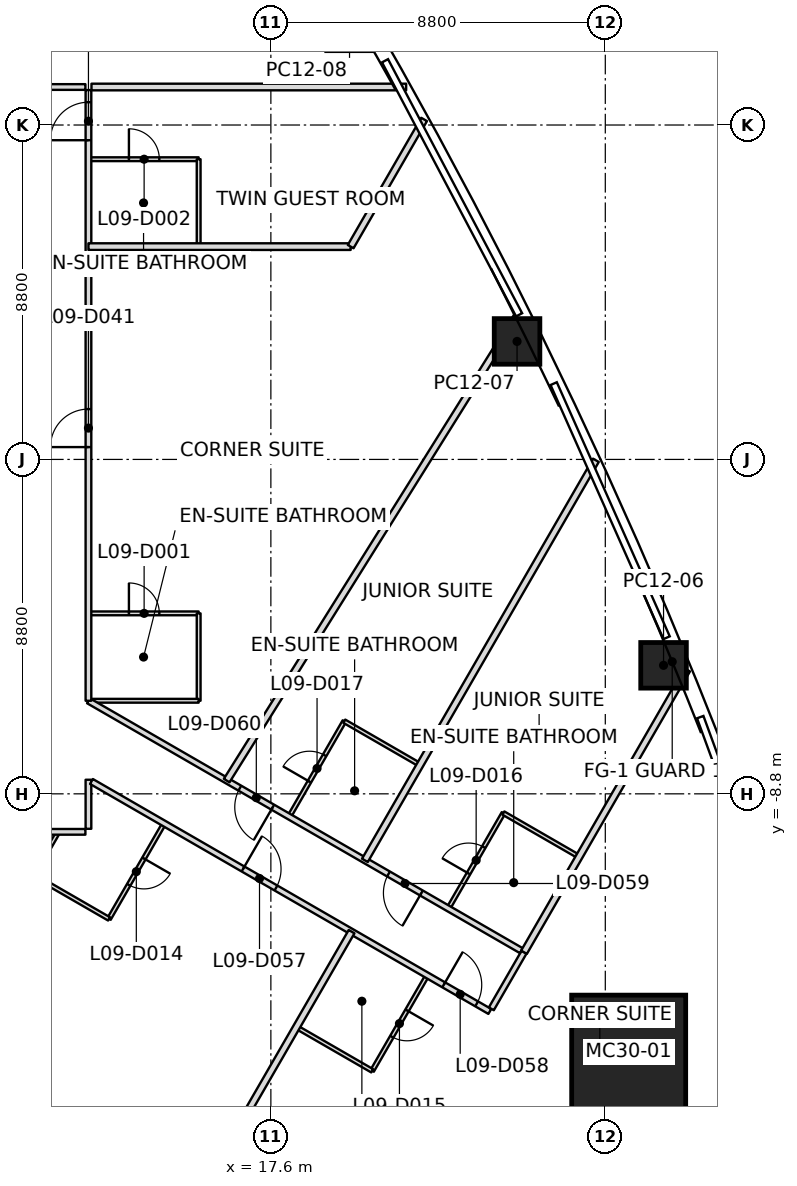
"""IFC4 building model, lengths in metres.
Left out: names, types, materials, properties, quantities, classifications, styles, units other than length and angle.
Written with IfcOpenShell. Run it as: python <this file> out.ifc"""

import sys

from ifc_helpers import new_model, si_unit, direction, frame, frame_2d, origin, origin_2d, place, context, subcontext, project, spatial, rectangle, extrude, element, fill, save


model = new_model("IFC4")
c1 = context("Model", 3, precision=1e-05, world=origin(), true_north=direction((0.0, 1.0)))
c2 = subcontext(c1, "Body", "Model", "MODEL_VIEW")
j1 = project(units=[si_unit("LENGTHUNIT", "METRE"), si_unit("PLANEANGLEUNIT", "RADIAN")], contexts=[c1])
p1 = place(None, origin())
s1 = spatial("IfcSite", under=j1, at=p1, CompositionType="ELEMENT")
p2 = place(p1, origin())
s2 = spatial("IfcBuilding", under=s1, at=p2, CompositionType="ELEMENT")
p3 = place(p2, frame((0.0, 0.0, 55.4)))
s3 = spatial("IfcBuildingStorey", under=s2, at=p3, CompositionType="ELEMENT", Elevation=55.4)
p4 = place(p3, frame((27.015, -15.597, 0.0), z_axis=(-0.030595822255, 0.017671724923, 0.999375607967), x_axis=(0.999531838243, 0.000540934199, 0.030591040022)))
e1 = element("IfcColumn", 1, at=p4, inside=s3, PredefinedType="COLUMN", context=c2, shape_type="SweptSolid", body=[
    extrude(rectangle(XDim=3.0, YDim=3.0, at=origin_2d()), origin(), (0.0, 0.0, 1.0), 3.702),
])
p5 = place(p3, frame((27.933, -5.418, 0.0), z_axis=(-0.019459371732, 0.011015983319, 0.999749959221), x_axis=(-0.381749906574, 0.924097828084, -0.017612863535)))
e2 = element("IfcColumn", 2, at=p5, inside=s3, PredefinedType="COLUMN", context=c2, shape_type="SweptSolid", body=[
    extrude(rectangle(XDim=1.2, YDim=1.2, at=origin_2d()), origin(), (0.0, 0.0, 1.0), 3.701),
])
p6 = place(p3, frame((24.078, 3.105, 0.0), z_axis=(-0.0153715921, 0.00230903744, 0.999879183953), x_axis=(-0.441818489924, 0.897060674508, -0.00886387119)))
e3 = element("IfcColumn", 3, at=p6, inside=s3, PredefinedType="COLUMN", context=c2, shape_type="SweptSolid", body=[
    extrude(rectangle(XDim=1.2, YDim=1.2, at=origin_2d()), origin(), (0.0, 0.0, 1.0), 3.701),
])
p7 = place(p3, frame((19.67, 11.356, 0.0), z_axis=(-0.010688020009, -0.006201690622, 0.999923649716), x_axis=(-0.499971440741, 0.866041891424, 2.7221193e-05)))
e4 = element("IfcColumn", 4, at=p7, inside=s3, PredefinedType="COLUMN", context=c2, shape_type="SweptSolid", body=[
    extrude(rectangle(XDim=1.2, YDim=1.2, at=origin_2d()), origin(), (0.0, 0.0, 1.0), 3.7),
])
p8 = place(p3, frame((19.724, -12.427, 0.0), z_axis=(0.0, 0.0, 1.0), x_axis=(-0.499994112739, -0.866028802769, 0.0)))
e5 = element("IfcWall", 5, at=p8, inside=s3, PredefinedType="PARTITIONING", context=c2, shape_type="SweptSolid", body=[
    extrude(rectangle(XDim=13.847, YDim=0.175, at=frame_2d((6.924, 0.0))), origin(), (0.0, 0.0, 1.0), 2.797),
])
p9 = place(p3, frame((12.8, 5.6, 0.0), z_axis=(0.0, 0.0, 1.0), x_axis=(1.0, 0.0, 0.0)))
e6 = element("IfcWall", 6, at=p9, inside=s3, PredefinedType="PARTITIONING", context=c2, shape_type="SweptSolid", body=[
    extrude(rectangle(XDim=6.9, YDim=0.175, at=frame_2d((3.45, 0.0))), origin(), (0.0, 0.0, 1.0), 3.0),
])
p10 = place(p3, frame((19.7, 5.6, 0.0), z_axis=(0.0, 0.0, 1.0), x_axis=(0.500059696094, 0.865990935485, 0.0)))
e7 = element("IfcWall", 7, at=p10, inside=s3, PredefinedType="PARTITIONING", context=c2, shape_type="SweptSolid", body=[
    extrude(rectangle(XDim=3.864, YDim=0.175, at=frame_2d((1.932, 0.0))), origin(), (0.0, 0.0, 1.0), 2.934),
])
p11 = place(p3, frame((12.88, 9.8, 0.0), z_axis=(0.0, 0.0, 1.0), x_axis=(1.0, 0.0, 0.0)))
e8 = element("IfcWall", 8, at=p11, inside=s3, PredefinedType="PARTITIONING", context=c2, shape_type="SweptSolid", body=[
    extrude(rectangle(XDim=8.28, YDim=0.175, at=frame_2d((4.14, 0.0))), origin(), (0.0, 0.0, 1.0), 2.934),
])
p12 = place(p3, frame((24.065, 3.75, 0.0), z_axis=(0.0, 0.0, 1.0), x_axis=(-0.530143821716, -0.847907735721, 0.0)))
e9 = element("IfcWall", 9, at=p12, inside=s3, PredefinedType="PARTITIONING", context=c2, shape_type="SweptSolid", body=[
    extrude(rectangle(XDim=14.389, YDim=0.175, at=frame_2d((7.194, 0.0))), origin(), (0.0, 0.0, 1.0), 2.947),
])
p13 = place(p3, frame((20.075, -10.551, 0.0), z_axis=(0.0, 0.0, 1.0), x_axis=(0.500001190589, 0.866024716396, 0.0)))
e10 = element("IfcWall", 10, at=p13, inside=s3, PredefinedType="PARTITIONING", context=c2, shape_type="SweptSolid", body=[
    extrude(rectangle(XDim=12.156, YDim=0.175, at=frame_2d((6.078, 0.0))), origin(), (0.0, 0.0, 1.0), 2.934),
])
p14 = place(p3, frame((24.261, -12.968, 0.0), z_axis=(0.0, 0.0, 1.0), x_axis=(0.500006467099, 0.866021669971, 0.0)))
e11 = element("IfcWall", 11, at=p14, inside=s3, PredefinedType="PARTITIONING", context=c2, shape_type="SweptSolid", body=[
    extrude(rectangle(XDim=8.582, YDim=0.175, at=frame_2d((4.291, 0.0))), origin(), (0.0, 0.0, 1.0), 2.934),
])
p15 = place(p3, frame((-12.72, -9.8, 0.0), z_axis=(0.0, 0.0, 1.0), x_axis=(1.0, 0.0, 0.0)))
e12 = element("IfcWall", 12, at=p15, inside=s3, PredefinedType="PARTITIONING", context=c2, shape_type="SweptSolid", body=[
    extrude(rectangle(XDim=25.44, YDim=0.15, at=frame_2d((12.72, 0.0))), origin(), (0.0, 0.0, 1.0), 2.797),
])
p16 = place(p15, frame((7.32, 0.0, 0.0)))
e13 = element("IfcOpeningElement", 13, at=p16, cuts=e12, PredefinedType="OPENING", context=c2, shape_type="SweptSolid", body=[
    extrude(rectangle(XDim=1.0, YDim=2.1, at=frame_2d((0.5, 1.05))), frame((0.0, 0.075, 0.0), z_axis=(0.0, -1.0, 0.0), x_axis=(1.0, 0.0, 0.0)), (0.0, 0.0, 1.0), 0.15),
])
p17 = place(p15, frame((11.52, 0.0, 0.0)))
e14 = element("IfcOpeningElement", 14, at=p17, cuts=e12, PredefinedType="OPENING", context=c2, shape_type="SweptSolid", body=[
    extrude(rectangle(XDim=1.0, YDim=2.1, at=frame_2d((0.5, 1.05))), frame((0.0, 0.075, 0.0), z_axis=(0.0, -1.0, 0.0), x_axis=(1.0, 0.0, 0.0)), (0.0, 0.0, 1.0), 0.15),
])
p18 = place(p15, frame((15.72, 0.0, 0.0)))
e15 = element("IfcOpeningElement", 15, at=p18, cuts=e12, PredefinedType="OPENING", context=c2, shape_type="SweptSolid", body=[
    extrude(rectangle(XDim=1.0, YDim=2.1, at=frame_2d((0.5, 1.05))), frame((0.0, 0.075, 0.0), z_axis=(0.0, -1.0, 0.0), x_axis=(1.0, 0.0, 0.0)), (0.0, 0.0, 1.0), 0.15),
])
p19 = place(p15, frame((19.92, 0.0, 0.0)))
e16 = element("IfcOpeningElement", 16, at=p19, cuts=e12, PredefinedType="OPENING", context=c2, shape_type="SweptSolid", body=[
    extrude(rectangle(XDim=1.0, YDim=2.1, at=frame_2d((0.5, 1.05))), frame((0.0, 0.075, 0.0), z_axis=(0.0, -1.0, 0.0), x_axis=(1.0, 0.0, 0.0)), (0.0, 0.0, 1.0), 0.15),
])
p20 = place(p3, frame((12.72, 9.8, 0.0), z_axis=(0.0, 0.0, 1.0), x_axis=(-1.0, 0.0, 0.0)))
e17 = element("IfcWall", 17, at=p20, inside=s3, PredefinedType="PARTITIONING", context=c2, shape_type="SweptSolid", body=[
    extrude(rectangle(XDim=3.42, YDim=0.15, at=frame_2d((1.71, 0.0))), origin(), (0.0, 0.0, 1.0), 3.0),
])
p21 = place(p20, frame((1.16, 0.0, 0.0)))
e18 = element("IfcOpeningElement", 18, at=p21, cuts=e17, PredefinedType="OPENING", context=c2, shape_type="SweptSolid", body=[
    extrude(rectangle(XDim=1.0, YDim=2.1, at=frame_2d((0.5, 1.05))), frame((0.0, 0.075, 0.0), z_axis=(0.0, -1.0, 0.0), x_axis=(1.0, 0.0, 0.0)), (0.0, 0.0, 1.0), 0.15),
])
p22 = place(p3, frame((12.8, -9.72, 0.0), z_axis=(0.0, 0.0, 1.0), x_axis=(0.0, 1.0, 0.0)))
e19 = element("IfcWall", 19, at=p22, inside=s3, PredefinedType="PARTITIONING", context=c2, shape_type="SweptSolid", body=[
    extrude(rectangle(XDim=1.291, YDim=0.15, at=frame_2d((0.646, 0.0))), origin(), (0.0, 0.0, 1.0), 2.797),
])
p23 = place(p3, frame((12.879, -8.475, 0.0), z_axis=(0.0, 0.0, 1.0), x_axis=(0.866028715104, -0.499994264582, 0.0)))
e20 = element("IfcWall", 20, at=p23, inside=s3, PredefinedType="PARTITIONING", context=c2, shape_type="SweptSolid", body=[
    extrude(rectangle(XDim=12.103, YDim=0.15, at=frame_2d((6.052, 0.0))), origin(), (0.0, 0.0, 1.0), 2.797),
])
p24 = place(p23, frame((4.606, 0.0, 0.0)))
e21 = element("IfcOpeningElement", 21, at=p24, cuts=e20, PredefinedType="OPENING", context=c2, shape_type="SweptSolid", body=[
    extrude(rectangle(XDim=1.0, YDim=2.1, at=frame_2d((0.5, 1.05))), frame((0.0, 0.075, 0.0), z_axis=(0.0, -1.0, 0.0), x_axis=(1.0, 0.0, 0.0)), (0.0, 0.0, 1.0), 0.15),
])
p25 = place(p23, frame((10.703, 0.0, 0.0)))
e22 = element("IfcOpeningElement", 22, at=p25, cuts=e20, PredefinedType="OPENING", context=c2, shape_type="SweptSolid", body=[
    extrude(rectangle(XDim=1.0, YDim=2.1, at=frame_2d((0.5, 1.05))), frame((0.0, 0.075, 0.0), z_axis=(0.0, -1.0, 0.0), x_axis=(1.0, 0.0, 0.0)), (0.0, 0.0, 1.0), 0.15),
])
p26 = place(p3, frame((23.401, -14.458, 0.0), z_axis=(0.0, 0.0, 1.0), x_axis=(0.500062383118, 0.865989383878, 0.0)))
e23 = element("IfcWall", 23, at=p26, inside=s3, PredefinedType="PARTITIONING", context=c2, shape_type="SweptSolid", body=[
    extrude(rectangle(XDim=1.72, YDim=0.15, at=frame_2d((0.86, 0.0))), origin(), (0.0, 0.0, 1.0), 2.797),
])
p27 = place(p3, frame((24.192, -12.928, 0.0), z_axis=(0.0, 0.0, 1.0), x_axis=(-0.866018681408, 0.500011643316, 0.0)))
e24 = element("IfcWall", 24, at=p27, inside=s3, PredefinedType="PARTITIONING", context=c2, shape_type="SweptSolid", body=[
    extrude(rectangle(XDim=13.154, YDim=0.15, at=frame_2d((6.577, 0.0))), origin(), (0.0, 0.0, 1.0), 2.947),
])
p28 = place(p27, frame((3.037, 0.0, 0.0)))
e25 = element("IfcOpeningElement", 25, at=p28, cuts=e24, PredefinedType="OPENING", context=c2, shape_type="SweptSolid", body=[
    extrude(rectangle(XDim=1.0, YDim=2.1, at=frame_2d((0.5, 1.05))), frame((0.0, 0.075, 0.0), z_axis=(0.0, -1.0, 0.0), x_axis=(1.0, 0.0, 0.0)), (0.0, 0.0, 1.0), 0.15),
])
p29 = place(p27, frame((7.554, 0.0, 0.0)))
e26 = element("IfcOpeningElement", 26, at=p29, cuts=e24, PredefinedType="OPENING", context=c2, shape_type="SweptSolid", body=[
    extrude(rectangle(XDim=1.0, YDim=2.1, at=frame_2d((0.5, 1.05))), frame((0.0, 0.075, 0.0), z_axis=(0.0, -1.0, 0.0), x_axis=(1.0, 0.0, 0.0)), (0.0, 0.0, 1.0), 0.15),
])
p30 = place(p3, frame((12.8, -6.351, 0.0), z_axis=(0.0, 0.0, 1.0), x_axis=(0.0, 1.0, 0.0)))
e27 = element("IfcWall", 27, at=p30, inside=s3, PredefinedType="PARTITIONING", context=c2, shape_type="SweptSolid", body=[
    extrude(rectangle(XDim=16.071, YDim=0.15, at=frame_2d((8.035, 0.0))), origin(), (0.0, 0.0, 1.0), 3.0),
])
p31 = place(p30, frame((6.676, 0.0, 0.0)))
e28 = element("IfcOpeningElement", 28, at=p31, cuts=e27, PredefinedType="OPENING", context=c2, shape_type="SweptSolid", body=[
    extrude(rectangle(XDim=1.0, YDim=2.1, at=frame_2d((0.5, 1.05))), frame((0.0, 0.075, 0.0), z_axis=(0.0, -1.0, 0.0), x_axis=(1.0, 0.0, 0.0)), (0.0, 0.0, 1.0), 0.15),
])
p32 = place(p30, frame((14.751, 0.0, 0.0)))
e29 = element("IfcOpeningElement", 29, at=p32, cuts=e27, PredefinedType="OPENING", context=c2, shape_type="SweptSolid", body=[
    extrude(rectangle(XDim=1.0, YDim=2.1, at=frame_2d((0.5, 1.05))), frame((0.0, 0.075, 0.0), z_axis=(0.0, -1.0, 0.0), x_axis=(1.0, 0.0, 0.0)), (0.0, 0.0, 1.0), 0.15),
])
p33 = place(p3, frame((14.777, -9.605, 0.0), z_axis=(0.0, 0.0, 1.0), x_axis=(-0.499999802827, -0.866025517622, 0.0)))
e30 = element("IfcWall", 30, at=p33, inside=s3, PredefinedType="PARTITIONING", context=c2, shape_type="SweptSolid", body=[
    extrude(rectangle(XDim=2.87, YDim=0.1, at=frame_2d((1.435, 0.0))), origin(), (0.0, 0.0, 1.0), 2.797),
])
p34 = place(p33, frame((1.035, 0.0, 0.0)))
e31 = element("IfcOpeningElement", 31, at=p34, cuts=e30, PredefinedType="OPENING", context=c2, shape_type="SweptSolid", body=[
    extrude(rectangle(XDim=0.8, YDim=2.1, at=frame_2d((0.4, 1.05))), frame((0.0, 0.05, 0.0), z_axis=(0.0, -1.0, 0.0), x_axis=(1.0, 0.0, 0.0)), (0.0, 0.0, 1.0), 0.1),
])
p35 = place(p3, frame((13.342, -12.091, 0.0), z_axis=(0.0, 0.0, 1.0), x_axis=(-0.86602648383, 0.499998129301, 0.0)))
e32 = element("IfcWall", 32, at=p35, inside=s3, PredefinedType="PARTITIONING", context=c2, shape_type="SweptSolid", body=[
    extrude(rectangle(XDim=2.3, YDim=0.1, at=frame_2d((1.15, 0.0))), origin(), (0.0, 0.0, 1.0), 2.947),
])
p36 = place(p3, frame((11.35, -10.941, 0.0), z_axis=(0.0, 0.0, 1.0), x_axis=(0.499865263774, 0.866103179807, 0.0)))
e33 = element("IfcWall", 33, at=p36, inside=s3, PredefinedType="PARTITIONING", context=c2, shape_type="SweptSolid", body=[
    extrude(rectangle(XDim=1.282, YDim=0.1, at=frame_2d((0.641, 0.0))), origin(), (0.0, 0.0, 1.0), 3.0),
])
p37 = place(p3, frame((12.83, -4.051, 0.0), z_axis=(0.0, 0.0, 1.0), x_axis=(1.0, 0.0, 0.0)))
e34 = element("IfcWall", 34, at=p37, inside=s3, PredefinedType="PARTITIONING", context=c2, shape_type="SweptSolid", body=[
    extrude(rectangle(XDim=2.87, YDim=0.1, at=frame_2d((1.435, 0.0))), origin(), (0.0, 0.0, 1.0), 3.0),
])
p38 = place(p37, frame((1.035, 0.0, 0.0)))
e35 = element("IfcOpeningElement", 35, at=p38, cuts=e34, PredefinedType="OPENING", context=c2, shape_type="SweptSolid", body=[
    extrude(rectangle(XDim=0.8, YDim=2.1, at=frame_2d((0.4, 1.05))), frame((0.0, 0.05, 0.0), z_axis=(0.0, -1.0, 0.0), x_axis=(1.0, 0.0, 0.0)), (0.0, 0.0, 1.0), 0.1),
])
p39 = place(p3, frame((15.7, -4.051, 0.0), z_axis=(0.0, 0.0, 1.0), x_axis=(0.0, -1.0, 0.0)))
e36 = element("IfcWall", 36, at=p39, inside=s3, PredefinedType="PARTITIONING", context=c2, shape_type="SweptSolid", body=[
    extrude(rectangle(XDim=2.3, YDim=0.1, at=frame_2d((1.15, 0.0))), origin(), (0.0, 0.0, 1.0), 2.947),
])
p40 = place(p3, frame((15.7, -6.351, 0.0), z_axis=(0.0, 0.0, 1.0), x_axis=(-1.0, 0.0, 0.0)))
e37 = element("IfcWall", 37, at=p40, inside=s3, PredefinedType="PARTITIONING", context=c2, shape_type="SweptSolid", body=[
    extrude(rectangle(XDim=2.84, YDim=0.1, at=frame_2d((1.42, 0.0))), origin(), (0.0, 0.0, 1.0), 2.947),
])
p41 = place(p3, frame((12.83, 7.9, 0.0), z_axis=(0.0, 0.0, 1.0), x_axis=(1.0, 0.0, 0.0)))
e38 = element("IfcWall", 38, at=p41, inside=s3, PredefinedType="PARTITIONING", context=c2, shape_type="SweptSolid", body=[
    extrude(rectangle(XDim=2.87, YDim=0.1, at=frame_2d((1.435, 0.0))), origin(), (0.0, 0.0, 1.0), 3.0),
])
p42 = place(p41, frame((1.035, 0.0, 0.0)))
e39 = element("IfcOpeningElement", 39, at=p42, cuts=e38, PredefinedType="OPENING", context=c2, shape_type="SweptSolid", body=[
    extrude(rectangle(XDim=0.8, YDim=2.1, at=frame_2d((0.4, 1.05))), frame((0.0, 0.05, 0.0), z_axis=(0.0, -1.0, 0.0), x_axis=(1.0, 0.0, 0.0)), (0.0, 0.0, 1.0), 0.1),
])
p43 = place(p3, frame((15.7, 7.9, 0.0), z_axis=(0.0, 0.0, 1.0), x_axis=(0.0, -1.0, 0.0)))
e40 = element("IfcWall", 40, at=p43, inside=s3, PredefinedType="PARTITIONING", context=c2, shape_type="SweptSolid", body=[
    extrude(rectangle(XDim=2.27, YDim=0.1, at=frame_2d((1.135, 0.0))), origin(), (0.0, 0.0, 1.0), 3.0),
])
p44 = place(p3, frame((18.098, -9.375, 0.0), z_axis=(0.0, 0.0, 1.0), x_axis=(0.499936001555, 0.866062350151, 0.0)))
e41 = element("IfcWall", 41, at=p44, inside=s3, PredefinedType="PARTITIONING", context=c2, shape_type="SweptSolid", body=[
    extrude(rectangle(XDim=2.87, YDim=0.1, at=frame_2d((1.435, 0.0))), origin(), (0.0, 0.0, 1.0), 2.947),
])
p45 = place(p44, frame((1.035, 0.0, 0.0)))
e42 = element("IfcOpeningElement", 42, at=p45, cuts=e41, PredefinedType="OPENING", context=c2, shape_type="SweptSolid", body=[
    extrude(rectangle(XDim=0.8, YDim=2.1, at=frame_2d((0.4, 1.05))), frame((0.0, 0.05, 0.0), z_axis=(0.0, -1.0, 0.0), x_axis=(1.0, 0.0, 0.0)), (0.0, 0.0, 1.0), 0.1),
])
p46 = place(p3, frame((19.533, -6.889, 0.0), z_axis=(0.0, 0.0, 1.0), x_axis=(0.866017224141, -0.500014167291, 0.0)))
e43 = element("IfcWall", 43, at=p46, inside=s3, PredefinedType="PARTITIONING", context=c2, shape_type="SweptSolid", body=[
    extrude(rectangle(XDim=2.27, YDim=0.1, at=frame_2d((1.135, 0.0))), origin(), (0.0, 0.0, 1.0), 2.947),
])
p47 = place(p3, frame((21.701, -13.603, 0.0), z_axis=(0.0, 0.0, 1.0), x_axis=(-0.500036638401, -0.866004249561, 0.0)))
e44 = element("IfcWall", 44, at=p47, inside=s3, PredefinedType="PARTITIONING", context=c2, shape_type="SweptSolid", body=[
    extrude(rectangle(XDim=2.87, YDim=0.1, at=frame_2d((1.435, 0.0))), origin(), (0.0, 0.0, 1.0), 3.0),
])
p48 = place(p47, frame((1.035, 0.0, 0.0)))
e45 = element("IfcOpeningElement", 45, at=p48, cuts=e44, PredefinedType="OPENING", context=c2, shape_type="SweptSolid", body=[
    extrude(rectangle(XDim=0.8, YDim=2.1, at=frame_2d((0.4, 1.05))), frame((0.0, 0.05, 0.0), z_axis=(0.0, -1.0, 0.0), x_axis=(1.0, 0.0, 0.0)), (0.0, 0.0, 1.0), 0.1),
])
p49 = place(p3, frame((20.266, -16.088, 0.0), z_axis=(0.0, 0.0, 1.0), x_axis=(-0.866017224141, 0.500014167291, 0.0)))
e46 = element("IfcWall", 46, at=p49, inside=s3, PredefinedType="PARTITIONING", context=c2, shape_type="SweptSolid", body=[
    extrude(rectangle(XDim=2.27, YDim=0.1, at=frame_2d((1.135, 0.0))), origin(), (0.0, 0.0, 1.0), 3.0),
])
p50 = place(p3, frame((22.284, -11.792, 0.0), z_axis=(0.0, 0.0, 1.0), x_axis=(0.499999802827, 0.866025517622, 0.0)))
e47 = element("IfcWall", 47, at=p50, inside=s3, PredefinedType="PARTITIONING", context=c2, shape_type="SweptSolid", body=[
    extrude(rectangle(XDim=2.87, YDim=0.1, at=frame_2d((1.435, 0.0))), origin(), (0.0, 0.0, 1.0), 3.0),
])
p51 = place(p50, frame((1.035, 0.0, 0.0)))
e48 = element("IfcOpeningElement", 48, at=p51, cuts=e47, PredefinedType="OPENING", context=c2, shape_type="SweptSolid", body=[
    extrude(rectangle(XDim=0.8, YDim=2.1, at=frame_2d((0.4, 1.05))), frame((0.0, 0.05, 0.0), z_axis=(0.0, -1.0, 0.0), x_axis=(1.0, 0.0, 0.0)), (0.0, 0.0, 1.0), 0.1),
])
p52 = place(p3, frame((23.719, -9.306, 0.0), z_axis=(0.0, 0.0, 1.0), x_axis=(0.866017224141, -0.500014167291, 0.0)))
e49 = element("IfcWall", 49, at=p52, inside=s3, PredefinedType="PARTITIONING", context=c2, shape_type="SweptSolid", body=[
    extrude(rectangle(XDim=2.27, YDim=0.1, at=frame_2d((1.135, 0.0))), origin(), (0.0, 0.0, 1.0), 3.0),
])
p53 = place(p31, origin())
e50 = element("IfcDoor", 50, at=p53, inside=s3, OperationType="SINGLE_SWING_LEFT", PredefinedType="DOOR", context=c2, shape_type="SweptSolid", body=[
    extrude(rectangle(XDim=1.0, YDim=2.1, at=frame_2d((0.5, 1.05))), frame((0.0, 0.025, 0.0), z_axis=(0.0, -1.0, 0.0), x_axis=(1.0, 0.0, 0.0)), (0.0, 0.0, 1.0), 0.05),
])
fill(e28, e50)
p54 = place(p38, origin())
e51 = element("IfcDoor", 51, at=p54, inside=s3, OperationType="SINGLE_SWING_LEFT", PredefinedType="DOOR", context=c2, shape_type="SweptSolid", body=[
    extrude(rectangle(XDim=0.8, YDim=2.1, at=frame_2d((0.4, 1.05))), frame((0.0, 0.025, 0.0), z_axis=(0.0, -1.0, 0.0), x_axis=(1.0, 0.0, 0.0)), (0.0, 0.0, 1.0), 0.05),
])
fill(e35, e51)
p55 = place(p32, origin())
e52 = element("IfcDoor", 52, at=p55, inside=s3, OperationType="SINGLE_SWING_LEFT", PredefinedType="DOOR", context=c2, shape_type="SweptSolid", body=[
    extrude(rectangle(XDim=1.0, YDim=2.1, at=frame_2d((0.5, 1.05))), frame((0.0, 0.025, 0.0), z_axis=(0.0, -1.0, 0.0), x_axis=(1.0, 0.0, 0.0)), (0.0, 0.0, 1.0), 0.05),
])
fill(e29, e52)
p56 = place(p42, origin())
e53 = element("IfcDoor", 53, at=p56, inside=s3, OperationType="SINGLE_SWING_LEFT", PredefinedType="DOOR", context=c2, shape_type="SweptSolid", body=[
    extrude(rectangle(XDim=0.8, YDim=2.1, at=frame_2d((0.4, 1.05))), frame((0.0, 0.025, 0.0), z_axis=(0.0, -1.0, 0.0), x_axis=(1.0, 0.0, 0.0)), (0.0, 0.0, 1.0), 0.05),
])
fill(e39, e53)
p57 = place(p24, origin())
e54 = element("IfcDoor", 54, at=p57, inside=s3, OperationType="SINGLE_SWING_RIGHT", PredefinedType="DOOR", context=c2, shape_type="SweptSolid", body=[
    extrude(rectangle(XDim=1.0, YDim=2.1, at=frame_2d((0.5, 1.05))), frame((0.0, 0.025, 0.0), z_axis=(0.0, -1.0, 0.0), x_axis=(1.0, 0.0, 0.0)), (0.0, 0.0, 1.0), 0.05),
])
fill(e21, e54)
p58 = place(p34, origin())
e55 = element("IfcDoor", 55, at=p58, inside=s3, OperationType="SINGLE_SWING_RIGHT", PredefinedType="DOOR", context=c2, shape_type="SweptSolid", body=[
    extrude(rectangle(XDim=0.8, YDim=2.1, at=frame_2d((0.4, 1.05))), frame((0.0, 0.025, 0.0), z_axis=(0.0, -1.0, 0.0), x_axis=(1.0, 0.0, 0.0)), (0.0, 0.0, 1.0), 0.05),
])
fill(e31, e55)
p59 = place(p25, origin())
e56 = element("IfcDoor", 56, at=p59, inside=s3, OperationType="SINGLE_SWING_RIGHT", PredefinedType="DOOR", context=c2, shape_type="SweptSolid", body=[
    extrude(rectangle(XDim=1.0, YDim=2.1, at=frame_2d((0.5, 1.05))), frame((0.0, 0.025, 0.0), z_axis=(0.0, -1.0, 0.0), x_axis=(1.0, 0.0, 0.0)), (0.0, 0.0, 1.0), 0.05),
])
fill(e22, e56)
p60 = place(p48, origin())
e57 = element("IfcDoor", 57, at=p60, inside=s3, OperationType="SINGLE_SWING_LEFT", PredefinedType="DOOR", context=c2, shape_type="SweptSolid", body=[
    extrude(rectangle(XDim=0.8, YDim=2.1, at=frame_2d((0.4, 1.05))), frame((0.0, 0.025, 0.0), z_axis=(0.0, -1.0, 0.0), x_axis=(1.0, 0.0, 0.0)), (0.0, 0.0, 1.0), 0.05),
])
fill(e45, e57)
p61 = place(p28, origin())
e58 = element("IfcDoor", 58, at=p61, inside=s3, OperationType="SINGLE_SWING_LEFT", PredefinedType="DOOR", context=c2, shape_type="SweptSolid", body=[
    extrude(rectangle(XDim=1.0, YDim=2.1, at=frame_2d((0.5, 1.05))), frame((0.0, 0.025, 0.0), z_axis=(0.0, -1.0, 0.0), x_axis=(1.0, 0.0, 0.0)), (0.0, 0.0, 1.0), 0.05),
])
fill(e25, e58)
p62 = place(p51, origin())
e59 = element("IfcDoor", 59, at=p62, inside=s3, OperationType="SINGLE_SWING_LEFT", PredefinedType="DOOR", context=c2, shape_type="SweptSolid", body=[
    extrude(rectangle(XDim=0.8, YDim=2.1, at=frame_2d((0.4, 1.05))), frame((0.0, 0.025, 0.0), z_axis=(0.0, -1.0, 0.0), x_axis=(1.0, 0.0, 0.0)), (0.0, 0.0, 1.0), 0.05),
])
fill(e48, e59)
p63 = place(p29, origin())
e60 = element("IfcDoor", 60, at=p63, inside=s3, OperationType="SINGLE_SWING_LEFT", PredefinedType="DOOR", context=c2, shape_type="SweptSolid", body=[
    extrude(rectangle(XDim=1.0, YDim=2.1, at=frame_2d((0.5, 1.05))), frame((0.0, 0.025, 0.0), z_axis=(0.0, -1.0, 0.0), x_axis=(1.0, 0.0, 0.0)), (0.0, 0.0, 1.0), 0.05),
])
fill(e26, e60)
p64 = place(p45, origin())
e61 = element("IfcDoor", 61, at=p64, inside=s3, OperationType="SINGLE_SWING_RIGHT", PredefinedType="DOOR", context=c2, shape_type="SweptSolid", body=[
    extrude(rectangle(XDim=0.8, YDim=2.1, at=frame_2d((0.4, 1.05))), frame((0.0, 0.025, 0.0), z_axis=(0.0, -1.0, 0.0), x_axis=(1.0, 0.0, 0.0)), (0.0, 0.0, 1.0), 0.05),
])
fill(e42, e61)
save(model, sys.argv[1])
